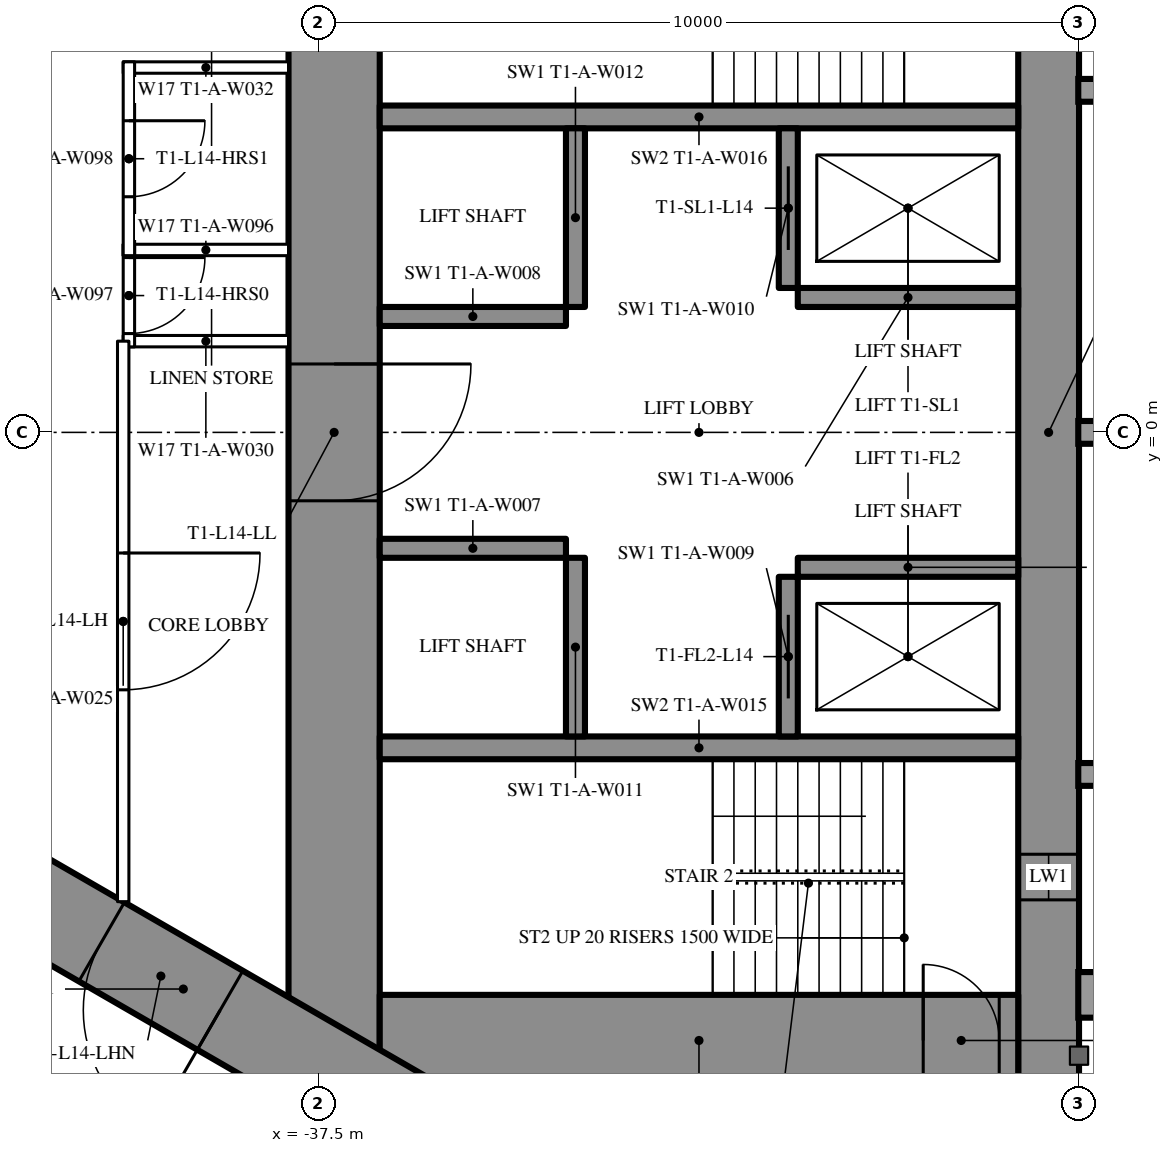
"""IFC4 building model, lengths in metres.
Left out: names, types, materials, properties, quantities, classifications, styles, units other than length and angle.
Written with IfcOpenShell. Run it as: python <this file> out.ifc"""

import sys

from ifc_helpers import new_model, si_unit, direction, frame, frame_2d, origin, place, context, subcontext, project, spatial, rectangle, extrude, element, fill, save


model = new_model("IFC4")
c1 = context("Model", 3, precision=1e-05, world=origin(), true_north=direction((0.0, 1.0)))
c2 = subcontext(c1, "Body", "Model", "MODEL_VIEW")
j1 = project(units=[si_unit("LENGTHUNIT", "METRE"), si_unit("PLANEANGLEUNIT", "RADIAN")], contexts=[c1])
p1 = place(None, origin())
s1 = spatial("IfcSite", under=j1, at=p1, CompositionType="ELEMENT")
p2 = place(p1, origin())
s2 = spatial("IfcBuilding", under=s1, at=p2, CompositionType="ELEMENT")
p3 = place(p2, frame((0.0, 0.0, 56.5)))
s3 = spatial("IfcBuildingStorey", under=s2, at=p3, CompositionType="ELEMENT", Elevation=56.5)
p4 = place(p3, frame((-27.9, 8.6, 0.0), z_axis=(0.0, 0.0, 1.0), x_axis=(0.0, -1.0, 0.0)))
e1 = element("IfcWall", 1, at=p4, inside=s3, PredefinedType="SHEAR", context=c2, shape_type="SweptSolid", body=[
    extrude(rectangle(XDim=17.2, YDim=0.8, at=frame_2d((8.6, 0.0))), origin(), (0.0, 0.0, 1.0), 3.5),
])
p5 = place(p4, frame((2.45, 0.0, 0.6)))
e2 = element("IfcOpeningElement", 2, at=p5, cuts=e1, PredefinedType="OPENING", context=c2, shape_type="SweptSolid", body=[
    extrude(rectangle(XDim=0.6, YDim=2.1, at=frame_2d((0.3, 1.05))), frame((0.0, 0.41, 0.0), z_axis=(0.0, -1.0, 0.0), x_axis=(1.0, 0.0, 0.0)), (0.0, 0.0, 1.0), 0.82),
])
p6 = place(p4, frame((14.15, 0.0, 0.6)))
e3 = element("IfcOpeningElement", 3, at=p6, cuts=e1, PredefinedType="OPENING", context=c2, shape_type="SweptSolid", body=[
    extrude(rectangle(XDim=0.6, YDim=2.1, at=frame_2d((0.3, 1.05))), frame((0.0, 0.41, 0.0), z_axis=(0.0, -1.0, 0.0), x_axis=(1.0, 0.0, 0.0)), (0.0, 0.0, 1.0), 0.82),
])
p7 = place(p3, frame((-37.3, 8.6, 0.0), z_axis=(0.0, 0.0, 1.0), x_axis=(0.0, -1.0, 0.0)))
e4 = element("IfcWall", 4, at=p7, inside=s3, PredefinedType="SHEAR", context=c2, shape_type="SweptSolid", body=[
    extrude(rectangle(XDim=17.2, YDim=1.2, at=frame_2d((8.6, 0.0))), origin(), (0.0, 0.0, 1.0), 3.5),
])
p8 = place(p7, frame((7.7, 0.0, 0.0)))
e5 = element("IfcOpeningElement", 5, at=p8, cuts=e4, PredefinedType="OPENING", context=c2, shape_type="SweptSolid", body=[
    extrude(rectangle(XDim=1.8, YDim=2.2, at=frame_2d((0.9, 1.1))), frame((0.0, 0.61, 0.0), z_axis=(0.0, -1.0, 0.0), x_axis=(1.0, 0.0, 0.0)), (0.0, 0.0, 1.0), 1.22),
])
p9 = place(p3, frame((-28.3, -8.0, 0.0), z_axis=(0.0, 0.0, 1.0), x_axis=(-1.0, 0.0, 0.0)))
e6 = element("IfcWall", 6, at=p9, inside=s3, PredefinedType="SHEAR", context=c2, shape_type="SweptSolid", body=[
    extrude(rectangle(XDim=8.4, YDim=1.2, at=frame_2d((4.2, 0.0))), origin(), (0.0, 0.0, 1.0), 3.5),
])
p10 = place(p9, frame((0.25, 0.0, 0.0)))
e7 = element("IfcOpeningElement", 7, at=p10, cuts=e6, PredefinedType="OPENING", context=c2, shape_type="SweptSolid", body=[
    extrude(rectangle(XDim=1.0, YDim=2.2, at=frame_2d((0.5, 1.1))), frame((0.0, 0.61, 0.0), z_axis=(0.0, -1.0, 0.0), x_axis=(1.0, 0.0, 0.0)), (0.0, 0.0, 1.0), 1.22),
])
for number, where, z_axis, x_axis in (
    (8, (-28.3, 4.15, 0.0), (0.0, 0.0, 1.0), (-1.0, 0.0, 0.0)),
    (9, (-28.3, -4.15, 0.0), (0.0, 0.0, 1.0), (-1.0, 0.0, 0.0)),
):
    element("IfcWall", number, at=place(p3, frame(where, z_axis=z_axis, x_axis=x_axis)), inside=s3, PredefinedType="SHEAR", context=c2, shape_type="SweptSolid", body=[
        extrude(rectangle(XDim=8.4, YDim=0.3, at=frame_2d((4.2, 0.0))), origin(), (0.0, 0.0, 1.0), 3.5),
    ])
p11 = place(p3, frame((-31.325, 4.0, 0.0), z_axis=(0.0, 0.0, 1.0), x_axis=(0.0, -1.0, 0.0)))
e10 = element("IfcWall", 10, at=p11, inside=s3, PredefinedType="SHEAR", context=c2, shape_type="SweptSolid", body=[
    extrude(rectangle(XDim=2.1, YDim=0.25, at=frame_2d((1.05, 0.0))), origin(), (0.0, 0.0, 1.0), 3.5),
])
p12 = place(p11, frame((0.5, 0.0, 0.0)))
e11 = element("IfcOpeningElement", 11, at=p12, cuts=e10, PredefinedType="OPENING", context=c2, shape_type="SweptSolid", body=[
    extrude(rectangle(XDim=1.1, YDim=2.2, at=frame_2d((0.55, 1.1))), frame((0.0, 0.135, 0.0), z_axis=(0.0, -1.0, 0.0), x_axis=(1.0, 0.0, 0.0)), (0.0, 0.0, 1.0), 0.27),
])
p13 = place(p3, frame((-34.125, 4.0, 0.0), z_axis=(0.0, 0.0, 1.0), x_axis=(0.0, -1.0, 0.0)))
e12 = element("IfcWall", 12, at=p13, inside=s3, PredefinedType="SHEAR", context=c2, shape_type="SweptSolid", body=[
    extrude(rectangle(XDim=2.35, YDim=0.25, at=frame_2d((1.175, 0.0))), origin(), (0.0, 0.0, 1.0), 3.5),
])
p14 = place(p3, frame((-28.3, 1.775, 0.0), z_axis=(0.0, 0.0, 1.0), x_axis=(-1.0, 0.0, 0.0)))
e13 = element("IfcWall", 13, at=p14, inside=s3, PredefinedType="SHEAR", context=c2, shape_type="SweptSolid", body=[
    extrude(rectangle(XDim=2.9, YDim=0.25, at=frame_2d((1.45, 0.0))), origin(), (0.0, 0.0, 1.0), 3.5),
])
p15 = place(p3, frame((-34.25, 1.525, 0.0), z_axis=(0.0, 0.0, 1.0), x_axis=(-1.0, 0.0, 0.0)))
e14 = element("IfcWall", 14, at=p15, inside=s3, PredefinedType="SHEAR", context=c2, shape_type="SweptSolid", body=[
    extrude(rectangle(XDim=2.45, YDim=0.25, at=frame_2d((1.225, 0.0))), origin(), (0.0, 0.0, 1.0), 3.5),
])
p16 = place(p3, frame((-31.325, -1.9, 0.0), z_axis=(0.0, 0.0, 1.0), x_axis=(0.0, -1.0, 0.0)))
e15 = element("IfcWall", 15, at=p16, inside=s3, PredefinedType="SHEAR", context=c2, shape_type="SweptSolid", body=[
    extrude(rectangle(XDim=2.1, YDim=0.25, at=frame_2d((1.05, 0.0))), origin(), (0.0, 0.0, 1.0), 3.5),
])
p17 = place(p16, frame((0.5, 0.0, 0.0)))
e16 = element("IfcOpeningElement", 16, at=p17, cuts=e15, PredefinedType="OPENING", context=c2, shape_type="SweptSolid", body=[
    extrude(rectangle(XDim=1.1, YDim=2.2, at=frame_2d((0.55, 1.1))), frame((0.0, 0.135, 0.0), z_axis=(0.0, -1.0, 0.0), x_axis=(1.0, 0.0, 0.0)), (0.0, 0.0, 1.0), 0.27),
])
p18 = place(p3, frame((-34.125, -1.65, 0.0), z_axis=(0.0, 0.0, 1.0), x_axis=(0.0, -1.0, 0.0)))
e17 = element("IfcWall", 17, at=p18, inside=s3, PredefinedType="SHEAR", context=c2, shape_type="SweptSolid", body=[
    extrude(rectangle(XDim=2.35, YDim=0.25, at=frame_2d((1.175, 0.0))), origin(), (0.0, 0.0, 1.0), 3.5),
])
p19 = place(p3, frame((-28.3, -1.775, 0.0), z_axis=(0.0, 0.0, 1.0), x_axis=(-1.0, 0.0, 0.0)))
e18 = element("IfcWall", 18, at=p19, inside=s3, PredefinedType="SHEAR", context=c2, shape_type="SweptSolid", body=[
    extrude(rectangle(XDim=2.9, YDim=0.25, at=frame_2d((1.45, 0.0))), origin(), (0.0, 0.0, 1.0), 3.5),
])
p20 = place(p3, frame((-34.25, -1.525, 0.0), z_axis=(0.0, 0.0, 1.0), x_axis=(-1.0, 0.0, 0.0)))
e19 = element("IfcWall", 19, at=p20, inside=s3, PredefinedType="SHEAR", context=c2, shape_type="SweptSolid", body=[
    extrude(rectangle(XDim=2.45, YDim=0.25, at=frame_2d((1.225, 0.0))), origin(), (0.0, 0.0, 1.0), 3.5),
])
p21 = place(p3, frame((-27.2, 14.3, 0.0), z_axis=(0.0, 0.0, 1.0), x_axis=(-0.866026593062, -0.499997940104, 0.0)))
e20 = element("IfcWall", 20, at=p21, inside=s3, PredefinedType="SHEAR", context=c2, shape_type="SweptSolid", body=[
    extrude(rectangle(XDim=28.946, YDim=1.2, at=frame_2d((14.473, 0.0))), origin(), (0.0, 0.0, 1.0), 3.5),
])
p22 = place(p21, frame((4.6, 0.0, 0.0)))
e21 = element("IfcOpeningElement", 21, at=p22, cuts=e20, PredefinedType="OPENING", context=c2, shape_type="SweptSolid", body=[
    extrude(rectangle(XDim=1.0, YDim=2.2, at=frame_2d((0.5, 1.1))), frame((0.0, 0.61, 0.0), z_axis=(0.0, -1.0, 0.0), x_axis=(1.0, 0.0, 0.0)), (0.0, 0.0, 1.0), 1.22),
])
p23 = place(p21, frame((13.395, 0.0, 0.0)))
e22 = element("IfcOpeningElement", 22, at=p23, cuts=e20, PredefinedType="OPENING", context=c2, shape_type="SweptSolid", body=[
    extrude(rectangle(XDim=1.8, YDim=2.2, at=frame_2d((0.9, 1.1))), frame((0.0, 0.61, 0.0), z_axis=(0.0, -1.0, 0.0), x_axis=(1.0, 0.0, 0.0)), (0.0, 0.0, 1.0), 1.22),
])
p24 = place(p3, frame((-27.2, -14.3, 0.0), z_axis=(0.0, 0.0, 1.0), x_axis=(-0.866024021859, 0.500002393557, 0.0)))
e23 = element("IfcWall", 23, at=p24, inside=s3, PredefinedType="SHEAR", context=c2, shape_type="SweptSolid", body=[
    extrude(rectangle(XDim=27.907, YDim=1.2, at=frame_2d((13.954, 0.0))), origin(), (0.0, 0.0, 1.0), 3.5),
])
p25 = place(p24, frame((4.6, 0.0, 0.0)))
e24 = element("IfcOpeningElement", 24, at=p25, cuts=e23, PredefinedType="OPENING", context=c2, shape_type="SweptSolid", body=[
    extrude(rectangle(XDim=1.0, YDim=2.2, at=frame_2d((0.5, 1.1))), frame((0.0, 0.61, 0.0), z_axis=(0.0, -1.0, 0.0), x_axis=(1.0, 0.0, 0.0)), (0.0, 0.0, 1.0), 1.22),
])
p26 = place(p24, frame((13.395, 0.0, 0.0)))
e25 = element("IfcOpeningElement", 25, at=p26, cuts=e23, PredefinedType="OPENING", context=c2, shape_type="SweptSolid", body=[
    extrude(rectangle(XDim=1.8, YDim=2.2, at=frame_2d((0.9, 1.1))), frame((0.0, 0.61, 0.0), z_axis=(0.0, -1.0, 0.0), x_axis=(1.0, 0.0, 0.0)), (0.0, 0.0, 1.0), 1.22),
])
p27 = place(p3, frame((-37.7, 10.894, 0.0), z_axis=(0.0, 0.0, 1.0), x_axis=(-0.866027905338, -0.499995667157, 0.0)))
e26 = element("IfcWall", 26, at=p27, inside=s3, PredefinedType="PARTITIONING", context=c2, shape_type="SweptSolid", body=[
    extrude(rectangle(XDim=21.787, YDim=0.2, at=frame_2d((10.894, 0.0))), origin(), (0.0, 0.0, 1.0), 3.25),
])
p28 = place(p27, frame((20.237, 0.0, 0.0)))
e27 = element("IfcOpeningElement", 27, at=p28, cuts=e26, PredefinedType="OPENING", context=c2, shape_type="SweptSolid", body=[
    extrude(rectangle(XDim=0.95, YDim=2.2, at=frame_2d((0.475, 1.1))), frame((0.0, 0.11, 0.0), z_axis=(0.0, -1.0, 0.0), x_axis=(1.0, 0.0, 0.0)), (0.0, 0.0, 1.0), 0.22),
])
p29 = place(p27, frame((7.73, 0.0, 0.0)))
e28 = element("IfcOpeningElement", 28, at=p29, cuts=e26, PredefinedType="OPENING", context=c2, shape_type="SweptSolid", body=[
    extrude(rectangle(XDim=0.95, YDim=2.2, at=frame_2d((0.475, 1.1))), frame((0.0, 0.11, 0.0), z_axis=(0.0, -1.0, 0.0), x_axis=(1.0, 0.0, 0.0)), (0.0, 0.0, 1.0), 0.22),
])
p30 = place(p3, frame((-36.92, -11.344, 0.0), z_axis=(0.0, 0.0, 1.0), x_axis=(-0.866028313256, 0.499994960614, 0.0)))
e29 = element("IfcWall", 29, at=p30, inside=s3, PredefinedType="PARTITIONING", context=c2, shape_type="SweptSolid", body=[
    extrude(rectangle(XDim=22.568, YDim=0.2, at=frame_2d((11.284, 0.0))), origin(), (0.0, 0.0, 1.0), 3.25),
])
p31 = place(p30, frame((12.68, 0.0, 0.0)))
e30 = element("IfcOpeningElement", 30, at=p31, cuts=e29, PredefinedType="OPENING", context=c2, shape_type="SweptSolid", body=[
    extrude(rectangle(XDim=0.95, YDim=2.2, at=frame_2d((0.475, 1.1))), frame((0.0, 0.11, 0.0), z_axis=(0.0, -1.0, 0.0), x_axis=(1.0, 0.0, 0.0)), (0.0, 0.0, 1.0), 0.22),
])
p32 = place(p30, frame((3.35, 0.0, 0.0)))
e31 = element("IfcOpeningElement", 31, at=p32, cuts=e29, PredefinedType="OPENING", context=c2, shape_type="SweptSolid", body=[
    extrude(rectangle(XDim=1.0, YDim=2.2, at=frame_2d((0.5, 1.1))), frame((0.0, 0.11, 0.0), z_axis=(0.0, -1.0, 0.0), x_axis=(1.0, 0.0, 0.0)), (0.0, 0.0, 1.0), 0.22),
])
for number, where, z_axis, x_axis in (
    (32, (-37.9, 1.2, 0.0), (0.0, 0.0, 1.0), (-1.0, 0.0, 0.0)),
    (33, (-37.9, 2.4, 0.0), (0.0, 0.0, 1.0), (-1.0, 0.0, 0.0)),
    (34, (-37.9, 4.8, 0.0), (0.0, 0.0, 1.0), (-1.0, 0.0, 0.0)),
):
    element("IfcWall", number, at=place(p3, frame(where, z_axis=z_axis, x_axis=x_axis)), inside=s3, PredefinedType="PARTITIONING", context=c2, shape_type="SweptSolid", body=[
        extrude(rectangle(XDim=2.175, YDim=0.15, at=frame_2d((1.087, 0.0))), origin(), (0.0, 0.0, 1.0), 3.25),
    ])
p33 = place(p3, frame((-40.0, 2.475, 0.0), z_axis=(0.0, 0.0, 1.0), x_axis=(0.0, -1.0, 0.0)))
e35 = element("IfcWall", 35, at=p33, inside=s3, PredefinedType="PARTITIONING", context=c2, shape_type="SweptSolid", body=[
    extrude(rectangle(XDim=1.35, YDim=0.15, at=frame_2d((0.675, 0.0))), origin(), (0.0, 0.0, 1.0), 3.25),
])
p34 = place(p33, frame((0.175, 0.0, 0.0)))
e36 = element("IfcOpeningElement", 36, at=p34, cuts=e35, PredefinedType="OPENING", context=c2, shape_type="SweptSolid", body=[
    extrude(rectangle(XDim=1.0, YDim=2.2, at=frame_2d((0.5, 1.1))), frame((0.0, 0.085, 0.0), z_axis=(0.0, -1.0, 0.0), x_axis=(1.0, 0.0, 0.0)), (0.0, 0.0, 1.0), 0.17),
])
p35 = place(p3, frame((-40.0, 4.875, 0.0), z_axis=(0.0, 0.0, 1.0), x_axis=(0.0, -1.0, 0.0)))
e37 = element("IfcWall", 37, at=p35, inside=s3, PredefinedType="PARTITIONING", context=c2, shape_type="SweptSolid", body=[
    extrude(rectangle(XDim=2.55, YDim=0.15, at=frame_2d((1.275, 0.0))), origin(), (0.0, 0.0, 1.0), 3.25),
])
p36 = place(p35, frame((0.775, 0.0, 0.0)))
e38 = element("IfcOpeningElement", 38, at=p36, cuts=e37, PredefinedType="OPENING", context=c2, shape_type="SweptSolid", body=[
    extrude(rectangle(XDim=1.0, YDim=2.2, at=frame_2d((0.5, 1.1))), frame((0.0, 0.085, 0.0), z_axis=(0.0, -1.0, 0.0), x_axis=(1.0, 0.0, 0.0)), (0.0, 0.0, 1.0), 0.17),
])
p37 = place(p3, frame((-40.075, 1.2, 0.0), z_axis=(0.0, 0.0, 1.0), x_axis=(0.0, -1.0, 0.0)))
e39 = element("IfcWall", 39, at=p37, inside=s3, PredefinedType="PARTITIONING", context=c2, shape_type="SweptSolid", body=[
    extrude(rectangle(XDim=7.374, YDim=0.15, at=frame_2d((3.687, 0.0))), origin(), (0.0, 0.0, 1.0), 3.25),
])
p38 = place(p37, frame((2.787, 0.0, 0.0)))
e40 = element("IfcOpeningElement", 40, at=p38, cuts=e39, PredefinedType="OPENING", context=c2, shape_type="SweptSolid", body=[
    extrude(rectangle(XDim=1.8, YDim=2.2, at=frame_2d((0.9, 1.1))), frame((0.0, 0.085, 0.0), z_axis=(0.0, -1.0, 0.0), x_axis=(1.0, 0.0, 0.0)), (0.0, 0.0, 1.0), 0.17),
])
p39 = place(p34, origin())
e41 = element("IfcDoor", 41, at=p39, inside=s3, OperationType="SINGLE_SWING_LEFT", PredefinedType="DOOR", context=c2, shape_type="SweptSolid", body=[
    extrude(rectangle(XDim=1.0, YDim=2.2, at=frame_2d((0.5, 1.1))), frame((0.0, 0.025, 0.0), z_axis=(0.0, -1.0, 0.0), x_axis=(1.0, 0.0, 0.0)), (0.0, 0.0, 1.0), 0.05),
])
fill(e36, e41)
p40 = place(p36, origin())
e42 = element("IfcDoor", 42, at=p40, inside=s3, OperationType="SINGLE_SWING_LEFT", PredefinedType="DOOR", context=c2, shape_type="SweptSolid", body=[
    extrude(rectangle(XDim=1.0, YDim=2.2, at=frame_2d((0.5, 1.1))), frame((0.0, 0.025, 0.0), z_axis=(0.0, -1.0, 0.0), x_axis=(1.0, 0.0, 0.0)), (0.0, 0.0, 1.0), 0.05),
])
fill(e38, e42)
p41 = place(p38, origin())
e43 = element("IfcDoor", 43, at=p41, inside=s3, OperationType="DOUBLE_DOOR_SINGLE_SWING", PredefinedType="DOOR", context=c2, shape_type="SweptSolid", body=[
    extrude(rectangle(XDim=1.8, YDim=2.2, at=frame_2d((0.9, 1.1))), frame((0.0, 0.025, 0.0), z_axis=(0.0, -1.0, 0.0), x_axis=(1.0, 0.0, 0.0)), (0.0, 0.0, 1.0), 0.05),
])
fill(e40, e43)
p42 = place(p26, origin())
e44 = element("IfcDoor", 44, at=p42, inside=s3, OperationType="DOUBLE_DOOR_SINGLE_SWING", PredefinedType="DOOR", context=c2, shape_type="SweptSolid", body=[
    extrude(rectangle(XDim=1.8, YDim=2.2, at=frame_2d((0.9, 1.1))), frame((0.0, 0.025, 0.0), z_axis=(0.0, -1.0, 0.0), x_axis=(1.0, 0.0, 0.0)), (0.0, 0.0, 1.0), 0.05),
])
fill(e25, e44)
p43 = place(p8, origin())
e45 = element("IfcDoor", 45, at=p43, inside=s3, OperationType="DOUBLE_DOOR_SINGLE_SWING", PredefinedType="DOOR", context=c2, shape_type="SweptSolid", body=[
    extrude(rectangle(XDim=1.8, YDim=2.2, at=frame_2d((0.9, 1.1))), frame((0.0, 0.025, 0.0), z_axis=(0.0, -1.0, 0.0), x_axis=(1.0, 0.0, 0.0)), (0.0, 0.0, 1.0), 0.05),
])
fill(e5, e45)
p44 = place(p10, origin())
e46 = element("IfcDoor", 46, at=p44, inside=s3, OperationType="SINGLE_SWING_RIGHT", PredefinedType="DOOR", context=c2, shape_type="SweptSolid", body=[
    extrude(rectangle(XDim=1.0, YDim=2.2, at=frame_2d((0.5, 1.1))), frame((0.0, 0.025, 0.0), z_axis=(0.0, -1.0, 0.0), x_axis=(1.0, 0.0, 0.0)), (0.0, 0.0, 1.0), 0.05),
])
fill(e7, e46)
p45 = place(p12, origin())
e47 = element("IfcDoor", 47, at=p45, inside=s3, OperationType="SLIDING_TO_LEFT", PredefinedType="USERDEFINED", context=c2, shape_type="SweptSolid", body=[
    extrude(rectangle(XDim=1.1, YDim=2.2, at=frame_2d((0.55, 1.1))), frame((0.0, 0.025, 0.0), z_axis=(0.0, -1.0, 0.0), x_axis=(1.0, 0.0, 0.0)), (0.0, 0.0, 1.0), 0.05),
])
fill(e11, e47)
p46 = place(p17, origin())
e48 = element("IfcDoor", 48, at=p46, inside=s3, OperationType="SLIDING_TO_LEFT", PredefinedType="USERDEFINED", context=c2, shape_type="SweptSolid", body=[
    extrude(rectangle(XDim=1.1, YDim=2.2, at=frame_2d((0.55, 1.1))), frame((0.0, 0.025, 0.0), z_axis=(0.0, -1.0, 0.0), x_axis=(1.0, 0.0, 0.0)), (0.0, 0.0, 1.0), 0.05),
])
fill(e16, e48)
p47 = place(p6, origin())
e49 = element("IfcWindow", 49, at=p47, inside=s3, PartitioningType="SINGLE_PANEL", PredefinedType="WINDOW", context=c2, shape_type="SweptSolid", body=[
    extrude(rectangle(XDim=0.6, YDim=2.1, at=frame_2d((0.3, 1.05))), frame((0.0, 0.03, 0.0), z_axis=(0.0, -1.0, 0.0), x_axis=(1.0, 0.0, 0.0)), (0.0, 0.0, 1.0), 0.06),
])
fill(e3, e49)
save(model, sys.argv[1])
